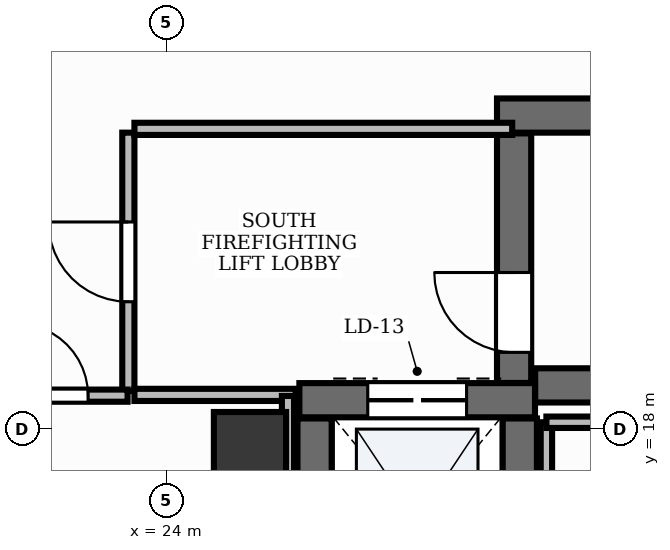
"""IFC4 building model, lengths in metres.
Left out: names, types, materials, properties, quantities, classifications, styles, units other than length and angle.
Written with IfcOpenShell. Run it as: python <this file> out.ifc"""

import sys

from ifc_helpers import new_model, si_unit, direction, frame, frame_2d, origin, origin_2d, place, context, subcontext, project, spatial, rectangle, extrude, element, fill, save


model = new_model("IFC4")
c1 = context("Model", 3, precision=1e-05, world=origin(), true_north=direction((0.0, 1.0)))
c2 = subcontext(c1, "Body", "Model", "MODEL_VIEW")
j1 = project(units=[si_unit("LENGTHUNIT", "METRE"), si_unit("PLANEANGLEUNIT", "RADIAN")], contexts=[c1])
p1 = place(None, origin())
s1 = spatial("IfcSite", under=j1, at=p1, CompositionType="ELEMENT")
p2 = place(p1, origin())
s2 = spatial("IfcBuilding", under=s1, at=p2, CompositionType="ELEMENT")
p3 = place(p2, frame((0.0, 0.0, 51.0)))
s3 = spatial("IfcBuildingStorey", under=s2, at=p3, CompositionType="ELEMENT", Elevation=51.0)
p4 = place(p3, frame((28.852, 18.575, 0.0), z_axis=(0.0, 0.0, 1.0), x_axis=(1.0, 0.0, 0.0)))
e1 = element("IfcWall", 1, at=p4, inside=s3, PredefinedType="SHEAR", context=c2, shape_type="SweptSolid", body=[
    extrude(rectangle(XDim=8.248, YDim=0.45, at=frame_2d((4.124, 0.0))), origin(), (0.0, 0.0, 1.0), 3.9),
])
p5 = place(p3, frame((28.35, 22.125, 0.0), z_axis=(0.0, 0.0, 1.0), x_axis=(1.0, 0.0, 0.0)))
e2 = element("IfcWall", 2, at=p5, inside=s3, PredefinedType="SHEAR", context=c2, shape_type="SweptSolid", body=[
    extrude(rectangle(XDim=8.75, YDim=0.45, at=frame_2d((4.375, 0.0))), origin(), (0.0, 0.0, 1.0), 3.9),
])
p6 = place(p3, frame((28.575, 18.607, 0.0), z_axis=(0.0, 0.0, 1.0), x_axis=(0.0, 1.0, 0.0)))
e3 = element("IfcWall", 3, at=p6, inside=s3, PredefinedType="SHEAR", context=c2, shape_type="SweptSolid", body=[
    extrude(rectangle(XDim=3.283, YDim=0.45, at=frame_2d((1.642, 0.0))), origin(), (0.0, 0.0, 1.0), 3.9),
])
p7 = place(p6, frame((0.403, 0.0, 0.0)))
e4 = element("IfcOpeningElement", 4, at=p7, cuts=e3, PredefinedType="OPENING", context=c2, shape_type="SweptSolid", body=[
    extrude(rectangle(XDim=1.05, YDim=2.15, at=frame_2d((0.525, 1.075))), frame((0.0, 0.24, 0.0), z_axis=(0.0, -1.0, 0.0), x_axis=(1.0, 0.0, 0.0)), (0.0, 0.0, 1.0), 0.48),
])
p8 = place(p3, frame((25.75, 18.38, 0.0), z_axis=(0.0, 0.0, 1.0), x_axis=(1.0, 0.0, 0.0)))
e5 = element("IfcWall", 5, at=p8, inside=s3, PredefinedType="SHEAR", context=c2, shape_type="SweptSolid", body=[
    extrude(rectangle(XDim=3.1, YDim=0.45, at=frame_2d((1.55, 0.0))), origin(), (0.0, 0.0, 1.0), 3.9),
])
p9 = place(p8, frame((0.9, 0.0, 0.0)))
e6 = element("IfcOpeningElement", 6, at=p9, cuts=e5, PredefinedType="OPENING", context=c2, shape_type="SweptSolid", body=[
    extrude(rectangle(XDim=1.3, YDim=2.2, at=frame_2d((0.65, 1.1))), frame((0.0, 0.24, 0.0), z_axis=(0.0, -1.0, 0.0), x_axis=(1.0, 0.0, 0.0)), (0.0, 0.0, 1.0), 0.48),
])
for number, where, z_axis, x_axis in (
    (7, (25.95, 15.44, 0.0), (0.0, 0.0, 1.0), (0.0, 1.0, 0.0)),
    (8, (28.65, 15.44, 0.0), (0.0, 0.0, 1.0), (0.0, 1.0, 0.0)),
):
    element("IfcWall", number, at=place(p3, frame(where, z_axis=z_axis, x_axis=x_axis)), inside=s3, PredefinedType="SHEAR", context=c2, shape_type="SweptSolid", body=[
        extrude(rectangle(XDim=2.7, YDim=0.45, at=frame_2d((1.35, 0.0))), origin(), (0.0, 0.0, 1.0), 3.9),
    ])
p10 = place(p3, frame((25.1, 17.75, -0.0), z_axis=(0.0, 0.0, 1.0), x_axis=(1.0, 0.0, 0.0)))
e9 = element("IfcColumn", 9, at=p10, inside=s3, PredefinedType="PILASTER", context=c2, shape_type="SweptSolid", body=[
    extrude(rectangle(XDim=0.95, YDim=0.95, at=origin_2d()), origin(), (0.0, 0.0, 1.0), 3.901),
])
p11 = place(p3, frame((23.5, 18.5, 0.0), z_axis=(0.0, 0.0, 1.0), x_axis=(0.0, 1.0, 0.0)))
e10 = element("IfcWall", 10, at=p11, inside=s3, PredefinedType="PARTITIONING", context=c2, shape_type="SweptSolid", body=[
    extrude(rectangle(XDim=3.4, YDim=0.16, at=frame_2d((1.7, 0.0))), origin(), (0.0, 0.0, 1.0), 2.91),
])
p12 = place(p11, frame((1.175, 0.0, 0.0)))
e11 = element("IfcOpeningElement", 11, at=p12, cuts=e10, PredefinedType="OPENING", context=c2, shape_type="SweptSolid", body=[
    extrude(rectangle(XDim=1.05, YDim=2.15, at=frame_2d((0.525, 1.075))), frame((0.0, 0.095, 0.0), z_axis=(0.0, -1.0, 0.0), x_axis=(1.0, 0.0, 0.0)), (0.0, 0.0, 1.0), 0.19),
])
p13 = place(p3, frame((23.58, 21.95, 0.0), z_axis=(0.0, 0.0, 1.0), x_axis=(1.0, 0.0, 0.0)))
e12 = element("IfcWall", 12, at=p13, inside=s3, PredefinedType="PARTITIONING", context=c2, shape_type="SweptSolid", body=[
    extrude(rectangle(XDim=4.97, YDim=0.16, at=frame_2d((2.485, 0.0))), origin(), (0.0, 0.0, 1.0), 2.91),
])
p14 = place(p3, frame((23.58, 18.45, 0.0), z_axis=(0.0, 0.0, 1.0), x_axis=(1.0, 0.0, 0.0)))
e13 = element("IfcWall", 13, at=p14, inside=s3, PredefinedType="PARTITIONING", context=c2, shape_type="SweptSolid", body=[
    extrude(rectangle(XDim=2.12, YDim=0.16, at=frame_2d((1.06, 0.0))), origin(), (0.0, 0.0, 1.0), 2.91),
])
p15 = place(p3, frame((20.623, 18.44, 0.0), z_axis=(0.0, 0.0, 1.0), x_axis=(1.0, 0.0, 0.0)))
e14 = element("IfcWall", 14, at=p15, inside=s3, PredefinedType="PARTITIONING", context=c2, shape_type="SweptSolid", body=[
    extrude(rectangle(XDim=2.867, YDim=0.16, at=frame_2d((1.434, 0.0))), origin(), (0.0, 0.0, 1.0), 2.91),
])
p16 = place(p15, frame((1.397, 0.0, 0.0)))
e15 = element("IfcOpeningElement", 15, at=p16, cuts=e14, PredefinedType="OPENING", context=c2, shape_type="SweptSolid", body=[
    extrude(rectangle(XDim=0.95, YDim=2.15, at=frame_2d((0.475, 1.075))), frame((0.0, 0.095, 0.0), z_axis=(0.0, -1.0, 0.0), x_axis=(1.0, 0.0, 0.0)), (0.0, 0.0, 1.0), 0.19),
])
p17 = place(p3, frame((25.6, 18.436, 0.0), z_axis=(0.0, 0.0, 1.0), x_axis=(0.0, -1.0, 0.0)))
e16 = element("IfcWall", 16, at=p17, inside=s3, PredefinedType="PARTITIONING", context=c2, shape_type="SweptSolid", body=[
    extrude(rectangle(XDim=3.482, YDim=0.16, at=frame_2d((1.741, 0.0))), origin(), (0.0, 0.0, 1.0), 2.91),
])
p18 = place(p3, frame((29.0, 14.954, 0.0), z_axis=(0.0, 0.0, 1.0), x_axis=(0.0, 1.0, 0.0)))
e17 = element("IfcWall", 17, at=p18, inside=s3, PredefinedType="PARTITIONING", context=c2, shape_type="SweptSolid", body=[
    extrude(rectangle(XDim=3.136, YDim=0.15, at=frame_2d((1.568, 0.0))), origin(), (0.0, 0.0, 1.0), 2.91),
])
p19 = place(p3, frame((29.0, 18.09, 0.0), z_axis=(0.0, 0.0, 1.0), x_axis=(1.0, 0.0, 0.0)))
e18 = element("IfcWall", 18, at=p19, inside=s3, PredefinedType="PARTITIONING", context=c2, shape_type="SweptSolid", body=[
    extrude(rectangle(XDim=8.35, YDim=0.15, at=frame_2d((4.175, 0.0))), origin(), (0.0, 0.0, 1.0), 2.91),
])
p20 = place(p7, origin())
e19 = element("IfcDoor", 19, at=p20, inside=s3, OperationType="SINGLE_SWING_RIGHT", PredefinedType="DOOR", context=c2, shape_type="SweptSolid", body=[
    extrude(rectangle(XDim=1.05, YDim=2.15, at=frame_2d((0.525, 1.075))), frame((0.0, 0.025, 0.0), z_axis=(0.0, -1.0, 0.0), x_axis=(1.0, 0.0, 0.0)), (0.0, 0.0, 1.0), 0.05),
])
fill(e4, e19)
p21 = place(p9, origin())
e20 = element("IfcDoor", 20, at=p21, inside=s3, OperationType="DOUBLE_DOOR_SLIDING", PredefinedType="DOOR", context=c2, shape_type="SweptSolid", body=[
    extrude(rectangle(XDim=1.3, YDim=2.2, at=frame_2d((0.65, 1.1))), frame((0.0, 0.025, 0.0), z_axis=(0.0, -1.0, 0.0), x_axis=(1.0, 0.0, 0.0)), (0.0, 0.0, 1.0), 0.05),
])
fill(e6, e20)
p22 = place(p12, origin())
e21 = element("IfcDoor", 21, at=p22, inside=s3, OperationType="SINGLE_SWING_RIGHT", PredefinedType="DOOR", context=c2, shape_type="SweptSolid", body=[
    extrude(rectangle(XDim=1.05, YDim=2.15, at=frame_2d((0.525, 1.075))), frame((0.0, 0.025, 0.0), z_axis=(0.0, -1.0, 0.0), x_axis=(1.0, 0.0, 0.0)), (0.0, 0.0, 1.0), 0.05),
])
fill(e11, e21)
p23 = place(p16, origin())
e22 = element("IfcDoor", 22, at=p23, inside=s3, OperationType="SINGLE_SWING_LEFT", PredefinedType="DOOR", context=c2, shape_type="SweptSolid", body=[
    extrude(rectangle(XDim=0.95, YDim=2.15, at=frame_2d((0.475, 1.075))), frame((0.0, 0.025, 0.0), z_axis=(0.0, -1.0, 0.0), x_axis=(1.0, 0.0, 0.0)), (0.0, 0.0, 1.0), 0.05),
])
fill(e15, e22)
save(model, sys.argv[1])
